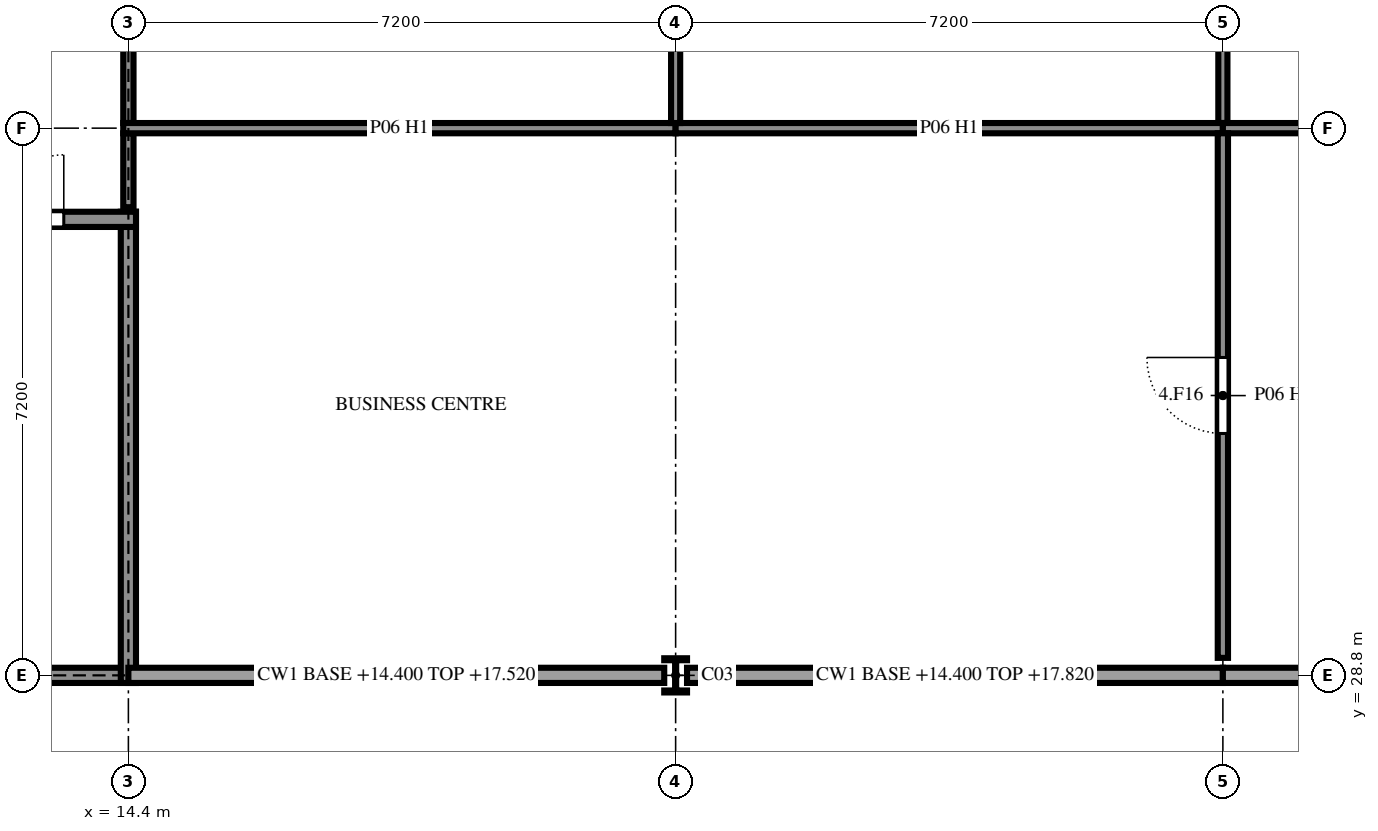
"""IFC4 building model, lengths in metres.
Left out: names, types, materials, properties, quantities, classifications, styles, units other than length and angle.
Written with IfcOpenShell. Run it as: python <this file> out.ifc"""

import sys

from ifc_helpers import new_model, si_unit, direction, frame, frame_2d, origin, origin_2d, place, context, subcontext, project, spatial, rectangle, i_section, extrude, element, fill, save


model = new_model("IFC4")
c1 = context("Model", 3, precision=1e-05, world=origin(), true_north=direction((0.0, 1.0)))
c2 = subcontext(c1, "Body", "Model", "MODEL_VIEW")
j1 = project(units=[si_unit("LENGTHUNIT", "METRE"), si_unit("PLANEANGLEUNIT", "RADIAN")], contexts=[c1])
p1 = place(None, origin())
s1 = spatial("IfcSite", under=j1, at=p1, CompositionType="ELEMENT")
p2 = place(p1, origin())
s2 = spatial("IfcBuilding", under=s1, at=p2, CompositionType="ELEMENT")
p3 = place(p2, frame((0.0, 0.0, 14.4)))
s3 = spatial("IfcBuildingStorey", under=s2, at=p3, CompositionType="ELEMENT", Elevation=14.4)
p4 = place(p3, frame((21.6, 28.8, 0.0), z_axis=(0.0, 0.0, 1.0), x_axis=(1.0, 0.0, 0.0)))
e1 = element("IfcColumn", 1, at=p4, inside=s3, PredefinedType="COLUMN", context=c2, shape_type="SweptSolid", body=[
    extrude(i_section(OverallWidth=0.3, OverallDepth=0.45, WebThickness=0.014, FlangeThickness=0.026, FilletRadius=0.027, at=origin_2d()), origin(), (0.0, 0.0, 1.0), 3.6),
])
p5 = place(p3, frame((11.725, 28.8, 0.0), z_axis=(0.0, 0.0, 1.0), x_axis=(1.0, 0.0, 0.0)))
e2 = element("IfcWall", 2, at=p5, inside=s3, PredefinedType="SHEAR", context=c2, shape_type="SweptSolid", body=[
    extrude(rectangle(XDim=2.775, YDim=0.2, at=frame_2d((1.387, 0.0))), origin(), (0.0, 0.0, 1.0), 3.6),
])
p6 = place(p3, frame((14.4, 28.7, 0.0), z_axis=(0.0, 0.0, 1.0), x_axis=(0.0, 1.0, 0.0)))
e3 = element("IfcWall", 3, at=p6, inside=s3, PredefinedType="SHEAR", context=c2, shape_type="SweptSolid", body=[
    extrude(rectangle(XDim=6.2, YDim=0.2, at=frame_2d((3.1, 0.0))), origin(), (0.0, 0.0, 1.0), 3.6),
])
p7 = place(p3, frame((14.5, 34.8, 0.0), z_axis=(0.0, 0.0, 1.0), x_axis=(-1.0, 0.0, 0.0)))
e4 = element("IfcWall", 4, at=p7, inside=s3, PredefinedType="SHEAR", context=c2, shape_type="SweptSolid", body=[
    extrude(rectangle(XDim=2.775, YDim=0.2, at=frame_2d((1.387, 0.0))), origin(), (0.0, 0.0, 1.0), 3.6),
])
p8 = place(p7, frame((0.95, 0.0, 0.0)))
e5 = element("IfcOpeningElement", 5, at=p8, cuts=e4, PredefinedType="OPENING", context=c2, shape_type="SweptSolid", body=[
    extrude(rectangle(XDim=0.85, YDim=2.1, at=frame_2d((0.425, 1.05))), frame((0.0, 0.11, 0.0), z_axis=(0.0, -1.0, 0.0), x_axis=(1.0, 0.0, 0.0)), (0.0, 0.0, 1.0), 0.22),
])
p9 = place(p3, frame((14.4, 50.333, 0.0), z_axis=(0.0, 0.0, 1.0), x_axis=(0.0, -1.0, 0.0)))
e6 = element("IfcWall", 6, at=p9, inside=s3, PredefinedType="PARTITIONING", context=c2, shape_type="SweptSolid", body=[
    extrude(rectangle(XDim=14.265, YDim=0.135, at=frame_2d((7.133, 0.0))), origin(), (0.0, 0.0, 1.0), 3.12),
])
p10 = place(p9, frame((6.35, 0.0, 0.0)))
e7 = element("IfcOpeningElement", 7, at=p10, cuts=e6, PredefinedType="OPENING", context=c2, shape_type="SweptSolid", body=[
    extrude(rectangle(XDim=1.5, YDim=2.1, at=frame_2d((0.75, 1.05))), frame((0.0, 0.077, 0.0), z_axis=(0.0, -1.0, 0.0), x_axis=(1.0, 0.0, 0.0)), (0.0, 0.0, 1.0), 0.155),
])
p11 = place(p3, frame((14.4, 35.933, 0.0), z_axis=(0.0, 0.0, 1.0), x_axis=(0.0, -1.0, 0.0)))
e8 = element("IfcWall", 8, at=p11, inside=s3, PredefinedType="PARTITIONING", context=c2, shape_type="SweptSolid", body=[
    extrude(rectangle(XDim=0.973, YDim=0.135, at=frame_2d((0.486, 0.0))), origin(), (0.0, 0.0, 1.0), 3.219),
])
p12 = place(p3, frame((21.6, 36.0, 0.0), z_axis=(0.0, 0.0, 1.0), x_axis=(-1.0, 0.0, 0.0)))
e9 = element("IfcWall", 9, at=p12, inside=s3, PredefinedType="PARTITIONING", context=c2, shape_type="SweptSolid", body=[
    extrude(rectangle(XDim=7.268, YDim=0.135, at=frame_2d((3.634, 0.0))), origin(), (0.0, 0.0, 1.0), 2.82),
])
p13 = place(p3, frame((28.8, 50.333, 0.0), z_axis=(0.0, 0.0, 1.0), x_axis=(0.0, -1.0, 0.0)))
e10 = element("IfcWall", 10, at=p13, inside=s3, PredefinedType="MOVABLE", context=c2, shape_type="SweptSolid", body=[
    extrude(rectangle(XDim=14.265, YDim=0.12, at=frame_2d((7.133, 0.0))), origin(), (0.0, 0.0, 1.0), 3.12),
])
p14 = place(p3, frame((28.8, 36.0, 0.0), z_axis=(0.0, 0.0, 1.0), x_axis=(-1.0, 0.0, 0.0)))
e11 = element("IfcWall", 11, at=p14, inside=s3, PredefinedType="PARTITIONING", context=c2, shape_type="SweptSolid", body=[
    extrude(rectangle(XDim=7.2, YDim=0.135, at=frame_2d((3.6, 0.0))), origin(), (0.0, 0.0, 1.0), 2.82),
])
p15 = place(p3, frame((36.067, 36.0, 0.0), z_axis=(0.0, 0.0, 1.0), x_axis=(-1.0, 0.0, 0.0)))
e12 = element("IfcWall", 12, at=p15, inside=s3, PredefinedType="PARTITIONING", context=c2, shape_type="SweptSolid", body=[
    extrude(rectangle(XDim=7.267, YDim=0.135, at=frame_2d((3.634, 0.0))), origin(), (0.0, 0.0, 1.0), 2.82),
])
p16 = place(p3, frame((28.8, 35.933, 0.0), z_axis=(0.0, 0.0, 1.0), x_axis=(0.0, -1.0, 0.0)))
e13 = element("IfcWall", 13, at=p16, inside=s3, PredefinedType="PARTITIONING", context=c2, shape_type="SweptSolid", body=[
    extrude(rectangle(XDim=6.903, YDim=0.135, at=frame_2d((3.451, 0.0))), origin(), (0.0, 0.0, 1.0), 3.12),
])
p17 = place(p16, frame((2.95, 0.0, 0.0)))
e14 = element("IfcOpeningElement", 14, at=p17, cuts=e13, PredefinedType="OPENING", context=c2, shape_type="SweptSolid", body=[
    extrude(rectangle(XDim=1.0, YDim=2.4, at=frame_2d((0.5, 1.2))), frame((0.0, 0.077, 0.0), z_axis=(0.0, -1.0, 0.0), x_axis=(1.0, 0.0, 0.0)), (0.0, 0.0, 1.0), 0.155),
])
p18 = place(p3, frame((21.6, 43.5, 0.0), z_axis=(0.0, 0.0, 1.0), x_axis=(0.0, -1.0, 0.0)))
e15 = element("IfcWall", 15, at=p18, inside=s3, PredefinedType="MOVABLE", context=c2, shape_type="SweptSolid", body=[
    extrude(rectangle(XDim=7.433, YDim=0.12, at=frame_2d((3.716, 0.0))), origin(), (0.0, 0.0, 1.0), 2.82),
])
p19 = place(p8, frame((0.85, 0.0, 0.0), z_axis=(0.0, 0.0, 1.0), x_axis=(-1.0, 0.0, 0.0)))
e16 = element("IfcDoor", 16, at=p19, inside=s3, OperationType="SINGLE_SWING_LEFT", PredefinedType="DOOR", context=c2, shape_type="SweptSolid", body=[
    extrude(rectangle(XDim=0.85, YDim=2.1, at=frame_2d((0.425, 1.05))), frame((0.0, 0.025, 0.0), z_axis=(0.0, -1.0, 0.0), x_axis=(1.0, 0.0, 0.0)), (0.0, 0.0, 1.0), 0.05),
])
fill(e5, e16)
p20 = place(p17, frame((1.0, 0.0, 0.0), z_axis=(0.0, 0.0, 1.0), x_axis=(-1.0, 0.0, 0.0)))
e17 = element("IfcDoor", 17, at=p20, inside=s3, OperationType="SINGLE_SWING_LEFT", PredefinedType="DOOR", context=c2, shape_type="SweptSolid", body=[
    extrude(rectangle(XDim=1.0, YDim=2.4, at=frame_2d((0.5, 1.2))), frame((0.0, 0.025, 0.0), z_axis=(0.0, -1.0, 0.0), x_axis=(1.0, 0.0, 0.0)), (0.0, 0.0, 1.0), 0.05),
])
fill(e14, e17)
save(model, sys.argv[1])
